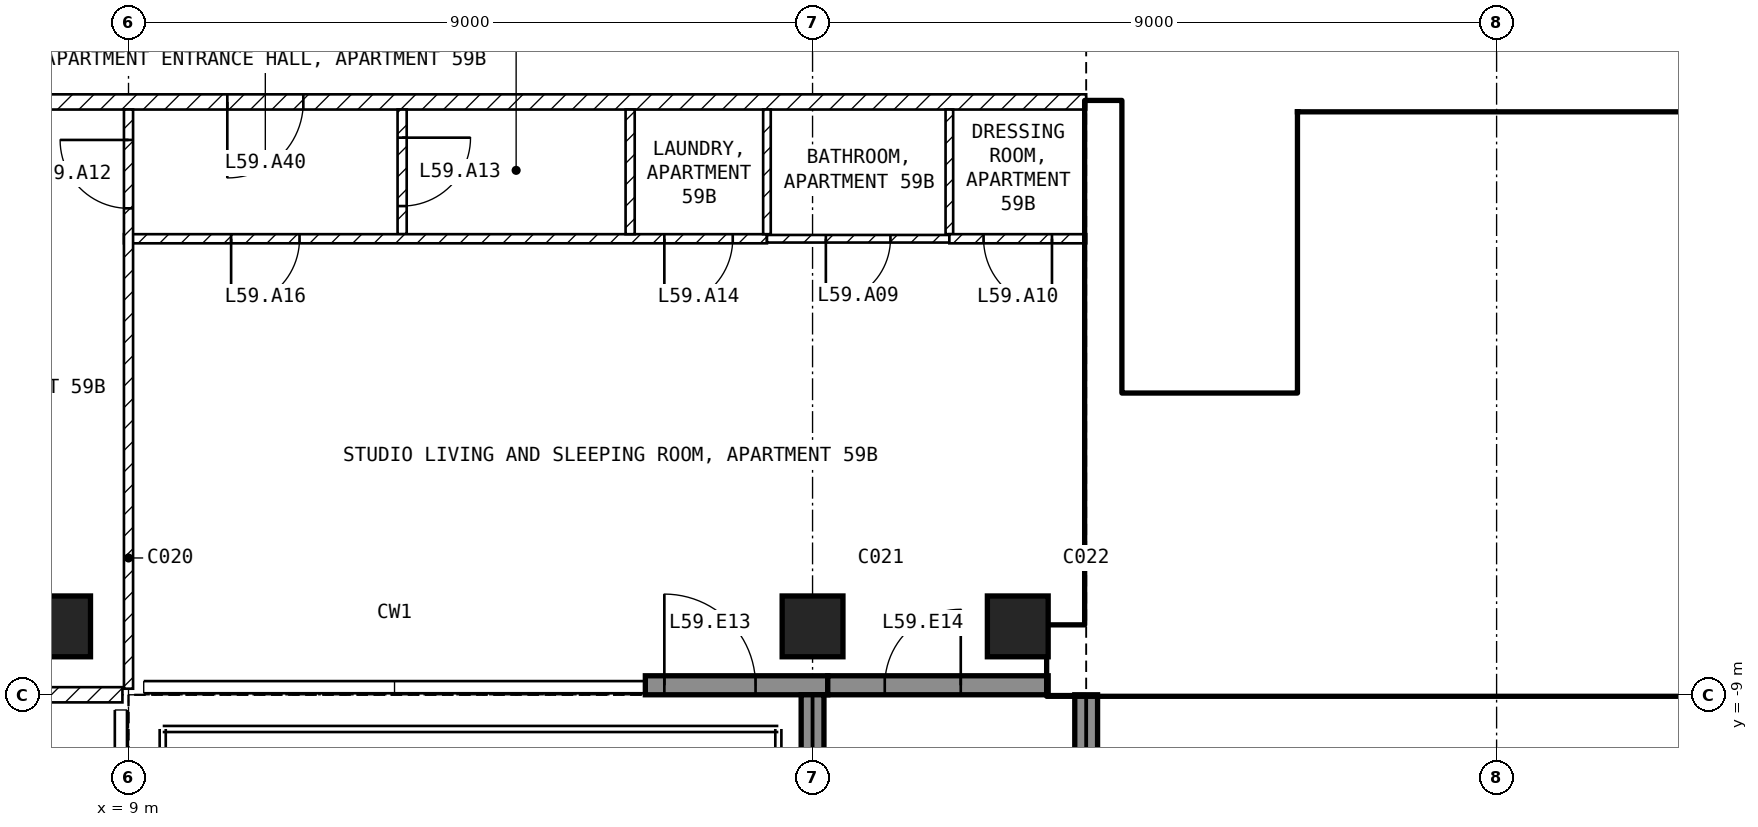
"""IFC4 building model, lengths in metres.
Left out: names, types, materials, properties, quantities, classifications, styles, units other than length and angle.
Written with IfcOpenShell. Run it as: python <this file> out.ifc"""

import sys

from ifc_helpers import new_model, si_unit, direction, frame, frame_2d, origin, origin_2d, place, context, subcontext, project, spatial, rectangle, extrude, element, fill, save


model = new_model("IFC4")
c1 = context("Model", 3, precision=1e-05, world=origin(), true_north=direction((0.0, 1.0)))
c2 = subcontext(c1, "Body", "Model", "MODEL_VIEW")
j1 = project(units=[si_unit("LENGTHUNIT", "METRE"), si_unit("PLANEANGLEUNIT", "RADIAN")], contexts=[c1])
p1 = place(None, origin())
s1 = spatial("IfcSite", under=j1, at=p1, CompositionType="ELEMENT")
p2 = place(p1, origin())
s2 = spatial("IfcBuilding", under=s1, at=p2, CompositionType="ELEMENT")
p3 = place(p2, frame((0.0, 0.0, 236.0)))
s3 = spatial("IfcBuildingStorey", under=s2, at=p3, CompositionType="ELEMENT", Elevation=236.0)
for number, where, z_axis, x_axis in (
    (1, (8.1, -8.1, -0.25), (0.0, 0.0, 1.0), (1.0, 0.0, 0.0)),
    (2, (18.0, -8.1, -0.25), (0.0, 0.0, 1.0), (1.0, 0.0, 0.0)),
    (3, (20.7, -8.1, -0.25), (0.0, 0.0, 1.0), (1.0, 0.0, 0.0)),
):
    element("IfcColumn", number, at=place(p3, frame(where, z_axis=z_axis, x_axis=x_axis)), inside=s3, PredefinedType="COLUMN", context=c2, shape_type="SweptSolid", body=[
        extrude(rectangle(XDim=0.8, YDim=0.8, at=origin_2d()), origin(), (0.0, 0.0, 1.0), 3.5),
    ])
p4 = place(p3, frame((15.8, -8.875, 0.0), z_axis=(0.0, 0.0, 1.0), x_axis=(1.0, 0.0, 0.0)))
e4 = element("IfcWall", 4, at=p4, inside=s3, PredefinedType="SOLIDWALL", context=c2, shape_type="SweptSolid", body=[
    extrude(rectangle(XDim=2.4, YDim=0.25, at=frame_2d((1.2, 0.0))), origin(), (0.0, 0.0, 1.0), 3.25),
])
p5 = place(p4, frame((0.25, 0.0, 0.0)))
e5 = element("IfcOpeningElement", 5, at=p5, cuts=e4, PredefinedType="OPENING", context=c2, shape_type="SweptSolid", body=[
    extrude(rectangle(XDim=1.2, YDim=2.4, at=frame_2d((0.6, 1.2))), frame((0.0, 0.135, 0.0), z_axis=(0.0, -1.0, 0.0), x_axis=(1.0, 0.0, 0.0)), (0.0, 0.0, 1.0), 0.27),
])
p6 = place(p3, frame((18.2, -8.875, 0.0), z_axis=(0.0, 0.0, 1.0), x_axis=(1.0, 0.0, 0.0)))
e6 = element("IfcWall", 6, at=p6, inside=s3, PredefinedType="SOLIDWALL", context=c2, shape_type="SweptSolid", body=[
    extrude(rectangle(XDim=2.9, YDim=0.25, at=frame_2d((1.45, 0.0))), origin(), (0.0, 0.0, 1.0), 3.25),
])
p7 = place(p6, frame((0.75, 0.0, 0.0)))
e7 = element("IfcOpeningElement", 7, at=p7, cuts=e6, PredefinedType="OPENING", context=c2, shape_type="SweptSolid", body=[
    extrude(rectangle(XDim=1.0, YDim=2.4, at=frame_2d((0.5, 1.2))), frame((0.0, 0.135, 0.0), z_axis=(0.0, -1.0, 0.0), x_axis=(1.0, 0.0, 0.0)), (0.0, 0.0, 1.0), 0.27),
])
p8 = place(p3, frame((18.0, -9.0, 0.0), z_axis=(0.0, 0.0, 1.0), x_axis=(0.0, -1.0, 0.0)))
e8 = element("IfcWall", 8, at=p8, inside=s3, PredefinedType="SOLIDWALL", context=c2, shape_type="SweptSolid", body=[
    extrude(rectangle(XDim=2.74, YDim=0.3, at=frame_2d((1.37, 0.0))), origin(), (0.0, 0.0, 1.0), 3.25),
])
p9 = place(p3, frame((21.6, -9.0, 0.0), z_axis=(0.0, 0.0, 1.0), x_axis=(0.0, -1.0, 0.0)))
e9 = element("IfcWall", 9, at=p9, inside=s3, PredefinedType="SOLIDWALL", context=c2, shape_type="SweptSolid", body=[
    extrude(rectangle(XDim=2.7, YDim=0.3, at=frame_2d((1.35, 0.0))), origin(), (0.0, 0.0, 1.0), 3.25),
])
p10 = place(p3, frame((21.1, -8.55, 0.0), z_axis=(0.0, 0.0, 1.0), x_axis=(1.0, 0.0, 0.0)))
e10 = element("IfcWall", 10, at=p10, inside=s3, PredefinedType="SHEAR", context=c2, shape_type="SweptSolid", body=[
    extrude(rectangle(XDim=9.1, YDim=0.9, at=frame_2d((4.55, 0.0))), origin(), (0.0, 0.0, 1.0), 3.25),
])
p11 = place(p3, frame((21.825, -8.1, 0.0), z_axis=(0.0, 0.0, 1.0), x_axis=(0.0, 1.0, 0.0)))
e11 = element("IfcWall", 11, at=p11, inside=s3, PredefinedType="SHEAR", context=c2, shape_type="SweptSolid", body=[
    extrude(rectangle(XDim=6.9, YDim=0.45, at=frame_2d((3.45, 0.0))), origin(), (0.0, 0.0, 1.0), 3.25),
])
p12 = place(p3, frame((24.5, -5.05, 0.0), z_axis=(0.0, 0.0, 1.0), x_axis=(0.0, 1.0, 0.0)))
e12 = element("IfcWall", 12, at=p12, inside=s3, PredefinedType="SOLIDWALL", context=c2, shape_type="SweptSolid", body=[
    extrude(rectangle(XDim=3.7, YDim=0.2, at=frame_2d((1.85, 0.0))), origin(), (0.0, 0.0, 1.0), 3.25),
])
p13 = place(p12, frame((0.1, 0.0, 0.0)))
e13 = element("IfcOpeningElement", 13, at=p13, cuts=e12, PredefinedType="OPENING", context=c2, shape_type="SweptSolid", body=[
    extrude(rectangle(XDim=0.8, YDim=2.1, at=frame_2d((0.4, 1.05))), frame((0.0, 0.11, 0.0), z_axis=(0.0, -1.0, 0.0), x_axis=(1.0, 0.0, 0.0)), (0.0, 0.0, 1.0), 0.22),
])
p14 = place(p3, frame((22.05, -5.15, 0.0), z_axis=(0.0, 0.0, 1.0), x_axis=(1.0, 0.0, 0.0)))
e14 = element("IfcWall", 14, at=p14, inside=s3, PredefinedType="SOLIDWALL", context=c2, shape_type="SweptSolid", body=[
    extrude(rectangle(XDim=6.3, YDim=0.2, at=frame_2d((3.15, 0.0))), origin(), (0.0, 0.0, 1.0), 3.25),
])
p15 = place(p14, frame((0.2, 0.0, 0.0)))
e15 = element("IfcOpeningElement", 15, at=p15, cuts=e14, PredefinedType="OPENING", context=c2, shape_type="SweptSolid", body=[
    extrude(rectangle(XDim=1.0, YDim=2.1, at=frame_2d((0.5, 1.05))), frame((0.0, 0.11, 0.0), z_axis=(0.0, -1.0, 0.0), x_axis=(1.0, 0.0, 0.0)), (0.0, 0.0, 1.0), 0.22),
])
p16 = place(p3, frame((28.25, -8.1, 0.0), z_axis=(0.0, 0.0, 1.0), x_axis=(0.0, 1.0, 0.0)))
e16 = element("IfcWall", 16, at=p16, inside=s3, PredefinedType="SOLIDWALL", context=c2, shape_type="SweptSolid", body=[
    extrude(rectangle(XDim=2.85, YDim=0.2, at=frame_2d((1.425, 0.0))), origin(), (0.0, 0.0, 1.0), 3.25),
])
p17 = place(p3, frame((24.6, -1.45, 0.0), z_axis=(0.0, 0.0, 1.0), x_axis=(1.0, 0.0, 0.0)))
e17 = element("IfcWall", 17, at=p17, inside=s3, PredefinedType="SOLIDWALL", context=c2, shape_type="SweptSolid", body=[
    extrude(rectangle(XDim=8.75, YDim=0.2, at=frame_2d((4.375, 0.0))), origin(), (0.0, 0.0, 1.0), 3.25),
])
p18 = place(p17, frame((0.4, 0.0, 0.0)))
e18 = element("IfcOpeningElement", 18, at=p18, cuts=e17, PredefinedType="OPENING", context=c2, shape_type="SweptSolid", body=[
    extrude(rectangle(XDim=1.0, YDim=2.1, at=frame_2d((0.5, 1.05))), frame((0.0, 0.11, 0.0), z_axis=(0.0, -1.0, 0.0), x_axis=(1.0, 0.0, 0.0)), (0.0, 0.0, 1.0), 0.22),
])
p19 = place(p17, frame((2.4, 0.0, 0.0)))
e19 = element("IfcOpeningElement", 19, at=p19, cuts=e17, PredefinedType="OPENING", context=c2, shape_type="SweptSolid", body=[
    extrude(rectangle(XDim=1.0, YDim=2.1, at=frame_2d((0.5, 1.05))), frame((0.0, 0.11, 0.0), z_axis=(0.0, -1.0, 0.0), x_axis=(1.0, 0.0, 0.0)), (0.0, 0.0, 1.0), 0.22),
])
p20 = place(p17, frame((4.4, 0.0, 0.0)))
e20 = element("IfcOpeningElement", 20, at=p20, cuts=e17, PredefinedType="OPENING", context=c2, shape_type="SweptSolid", body=[
    extrude(rectangle(XDim=1.0, YDim=2.1, at=frame_2d((0.5, 1.05))), frame((0.0, 0.11, 0.0), z_axis=(0.0, -1.0, 0.0), x_axis=(1.0, 0.0, 0.0)), (0.0, 0.0, 1.0), 0.22),
])
p21 = place(p17, frame((6.925, 0.0, 0.0)))
e21 = element("IfcOpeningElement", 21, at=p21, cuts=e17, PredefinedType="OPENING", context=c2, shape_type="SweptSolid", body=[
    extrude(rectangle(XDim=0.9, YDim=2.1, at=frame_2d((0.45, 1.05))), frame((0.0, 0.11, 0.0), z_axis=(0.0, -1.0, 0.0), x_axis=(1.0, 0.0, 0.0)), (0.0, 0.0, 1.0), 0.22),
])
p22 = place(p3, frame((24.6, -3.95, 0.0), z_axis=(0.0, 0.0, 1.0), x_axis=(1.0, 0.0, 0.0)))
e22 = element("IfcWall", 22, at=p22, inside=s3, PredefinedType="SOLIDWALL", context=c2, shape_type="SweptSolid", body=[
    extrude(rectangle(XDim=8.75, YDim=0.2, at=frame_2d((4.375, 0.0))), origin(), (0.0, 0.0, 1.0), 3.25),
])
for number, where, z_axis, x_axis in (
    (23, (26.5, -3.85, 0.0), (0.0, 0.0, 1.0), (0.0, 1.0, 0.0)),
    (24, (28.5, -3.85, 0.0), (0.0, 0.0, 1.0), (0.0, 1.0, 0.0)),
):
    element("IfcWall", number, at=place(p3, frame(where, z_axis=z_axis, x_axis=x_axis)), inside=s3, PredefinedType="SOLIDWALL", context=c2, shape_type="SweptSolid", body=[
        extrude(rectangle(XDim=2.3, YDim=0.2, at=frame_2d((1.15, 0.0))), origin(), (0.0, 0.0, 1.0), 3.25),
    ])
p23 = place(p3, frame((27.4, -5.05, 0.0), z_axis=(0.0, 0.0, 1.0), x_axis=(0.0, 1.0, 0.0)))
e25 = element("IfcWall", 25, at=p23, inside=s3, PredefinedType="PARTITIONING", context=c2, shape_type="SweptSolid", body=[
    extrude(rectangle(XDim=1.0, YDim=0.15, at=frame_2d((0.5, 0.0))), origin(), (0.0, 0.0, 1.0), 3.25),
])
p24 = place(p23, frame((0.1, 0.0, 0.0)))
e26 = element("IfcOpeningElement", 26, at=p24, cuts=e25, PredefinedType="OPENING", context=c2, shape_type="SweptSolid", body=[
    extrude(rectangle(XDim=0.8, YDim=2.1, at=frame_2d((0.4, 1.05))), frame((0.0, 0.085, 0.0), z_axis=(0.0, -1.0, 0.0), x_axis=(1.0, 0.0, 0.0)), (0.0, 0.0, 1.0), 0.17),
])
p25 = place(p3, frame((21.6, -1.2, 0.0), z_axis=(0.0, 0.0, 1.0), x_axis=(-1.0, 0.0, 0.0)))
e27 = element("IfcWall", 27, at=p25, inside=s3, PredefinedType="PARTITIONING", context=c2, shape_type="SweptSolid", body=[
    extrude(rectangle(XDim=17.2, YDim=0.2, at=frame_2d((8.6, 0.0))), origin(), (0.0, 0.0, 1.0), 3.25),
])
p26 = place(p25, frame((10.3, 0.0, 0.0)))
e28 = element("IfcOpeningElement", 28, at=p26, cuts=e27, PredefinedType="OPENING", context=c2, shape_type="SweptSolid", body=[
    extrude(rectangle(XDim=1.0, YDim=2.1, at=frame_2d((0.5, 1.05))), frame((0.0, 0.11, 0.0), z_axis=(0.0, -1.0, 0.0), x_axis=(1.0, 0.0, 0.0)), (0.0, 0.0, 1.0), 0.22),
])
p27 = place(p3, frame((8.92, -9.0, 0.0), z_axis=(0.0, 0.0, 1.0), x_axis=(-1.0, 0.0, 0.0)))
e29 = element("IfcWall", 29, at=p27, inside=s3, PredefinedType="PARTITIONING", context=c2, shape_type="SweptSolid", body=[
    extrude(rectangle(XDim=17.84, YDim=0.2, at=frame_2d((8.92, 0.0))), origin(), (0.0, 0.0, 1.0), 3.25),
])
p28 = place(p27, frame((8.42, 0.0, 0.0)))
e30 = element("IfcOpeningElement", 30, at=p28, cuts=e29, PredefinedType="OPENING", context=c2, shape_type="SweptSolid", body=[
    extrude(rectangle(XDim=1.0, YDim=2.1, at=frame_2d((0.5, 1.05))), frame((0.0, 0.11, 0.0), z_axis=(0.0, -1.0, 0.0), x_axis=(1.0, 0.0, 0.0)), (0.0, 0.0, 1.0), 0.22),
])
p29 = place(p3, frame((12.6, -1.3, 0.0), z_axis=(0.0, 0.0, 1.0), x_axis=(0.0, -1.0, 0.0)))
e31 = element("IfcWall", 31, at=p29, inside=s3, PredefinedType="PARTITIONING", context=c2, shape_type="SweptSolid", body=[
    extrude(rectangle(XDim=1.64, YDim=0.12, at=frame_2d((0.82, 0.0))), origin(), (0.0, 0.0, 1.0), 3.25),
])
p30 = place(p29, frame((0.37, 0.0, 0.0)))
e32 = element("IfcOpeningElement", 32, at=p30, cuts=e31, PredefinedType="OPENING", context=c2, shape_type="SweptSolid", body=[
    extrude(rectangle(XDim=0.9, YDim=2.1, at=frame_2d((0.45, 1.05))), frame((0.0, 0.07, 0.0), z_axis=(0.0, -1.0, 0.0), x_axis=(1.0, 0.0, 0.0)), (0.0, 0.0, 1.0), 0.14),
])
p31 = place(p3, frame((17.4, -3.0, 0.0), z_axis=(0.0, 0.0, 1.0), x_axis=(-1.0, 0.0, 0.0)))
e33 = element("IfcWall", 33, at=p31, inside=s3, PredefinedType="PARTITIONING", context=c2, shape_type="SweptSolid", body=[
    extrude(rectangle(XDim=8.46, YDim=0.12, at=frame_2d((4.23, 0.0))), origin(), (0.0, 0.0, 1.0), 3.25),
])
p32 = place(p31, frame((0.45, 0.0, 0.0)))
e34 = element("IfcOpeningElement", 34, at=p32, cuts=e33, PredefinedType="OPENING", context=c2, shape_type="SweptSolid", body=[
    extrude(rectangle(XDim=0.9, YDim=2.1, at=frame_2d((0.45, 1.05))), frame((0.0, 0.07, 0.0), z_axis=(0.0, -1.0, 0.0), x_axis=(1.0, 0.0, 0.0)), (0.0, 0.0, 1.0), 0.14),
])
p33 = place(p31, frame((6.15, 0.0, 0.0)))
e35 = element("IfcOpeningElement", 35, at=p33, cuts=e33, PredefinedType="OPENING", context=c2, shape_type="SweptSolid", body=[
    extrude(rectangle(XDim=0.9, YDim=2.1, at=frame_2d((0.45, 1.05))), frame((0.0, 0.07, 0.0), z_axis=(0.0, -1.0, 0.0), x_axis=(1.0, 0.0, 0.0)), (0.0, 0.0, 1.0), 0.14),
])
p34 = place(p3, frame((9.0, -8.92, 0.0), z_axis=(0.0, 0.0, 1.0), x_axis=(0.0, 1.0, 0.0)))
e36 = element("IfcWall", 36, at=p34, inside=s3, PredefinedType="PARTITIONING", context=c2, shape_type="SweptSolid", body=[
    extrude(rectangle(XDim=7.62, YDim=0.12, at=frame_2d((3.81, 0.0))), origin(), (0.0, 0.0, 1.0), 3.25),
])
p35 = place(p34, frame((6.32, 0.0, 0.0)))
e37 = element("IfcOpeningElement", 37, at=p35, cuts=e36, PredefinedType="OPENING", context=c2, shape_type="SweptSolid", body=[
    extrude(rectangle(XDim=0.9, YDim=2.1, at=frame_2d((0.45, 1.05))), frame((0.0, 0.07, 0.0), z_axis=(0.0, -1.0, 0.0), x_axis=(1.0, 0.0, 0.0)), (0.0, 0.0, 1.0), 0.14),
])
p36 = place(p3, frame((15.6, -1.3, 0.0), z_axis=(0.0, 0.0, 1.0), x_axis=(0.0, -1.0, 0.0)))
e38 = element("IfcWall", 38, at=p36, inside=s3, PredefinedType="PARTITIONING", context=c2, shape_type="SweptSolid", body=[
    extrude(rectangle(XDim=1.64, YDim=0.12, at=frame_2d((0.82, 0.0))), origin(), (0.0, 0.0, 1.0), 3.25),
])
for number, where, z_axis, x_axis in (
    (39, (17.4, -1.3, 0.0), (0.0, 0.0, 1.0), (0.0, -1.0, 0.0)),
    (40, (19.8, -1.3, 0.0), (0.0, 0.0, 1.0), (0.0, -1.0, 0.0)),
):
    element("IfcWall", number, at=place(p3, frame(where, z_axis=z_axis, x_axis=x_axis)), inside=s3, PredefinedType="PARTITIONING", context=c2, shape_type="SweptSolid", body=[
        extrude(rectangle(XDim=1.64, YDim=0.1, at=frame_2d((0.82, 0.0))), origin(), (0.0, 0.0, 1.0), 3.25),
    ])
p37 = place(p3, frame((19.8, -3.0, 0.0), z_axis=(0.0, 0.0, 1.0), x_axis=(-1.0, 0.0, 0.0)))
e41 = element("IfcWall", 41, at=p37, inside=s3, PredefinedType="PARTITIONING", context=c2, shape_type="SweptSolid", body=[
    extrude(rectangle(XDim=2.4, YDim=0.1, at=frame_2d((1.2, 0.0))), origin(), (0.0, 0.0, 1.0), 3.25),
])
p38 = place(p37, frame((0.775, 0.0, 0.0)))
e42 = element("IfcOpeningElement", 42, at=p38, cuts=e41, PredefinedType="OPENING", context=c2, shape_type="SweptSolid", body=[
    extrude(rectangle(XDim=0.85, YDim=2.1, at=frame_2d((0.425, 1.05))), frame((0.0, 0.06, 0.0), z_axis=(0.0, -1.0, 0.0), x_axis=(1.0, 0.0, 0.0)), (0.0, 0.0, 1.0), 0.12),
])
p39 = place(p3, frame((21.6, -3.0, 0.0), z_axis=(0.0, 0.0, 1.0), x_axis=(-1.0, 0.0, 0.0)))
e43 = element("IfcWall", 43, at=p39, inside=s3, PredefinedType="PARTITIONING", context=c2, shape_type="SweptSolid", body=[
    extrude(rectangle(XDim=1.8, YDim=0.12, at=frame_2d((0.9, 0.0))), origin(), (0.0, 0.0, 1.0), 3.25),
])
p40 = place(p39, frame((0.45, 0.0, 0.0)))
e44 = element("IfcOpeningElement", 44, at=p40, cuts=e43, PredefinedType="OPENING", context=c2, shape_type="SweptSolid", body=[
    extrude(rectangle(XDim=0.9, YDim=2.1, at=frame_2d((0.45, 1.05))), frame((0.0, 0.07, 0.0), z_axis=(0.0, -1.0, 0.0), x_axis=(1.0, 0.0, 0.0)), (0.0, 0.0, 1.0), 0.14),
])
p41 = place(p5, origin())
e45 = element("IfcDoor", 45, at=p41, inside=s3, OperationType="SINGLE_SWING_LEFT", PredefinedType="DOOR", context=c2, shape_type="SweptSolid", body=[
    extrude(rectangle(XDim=1.2, YDim=2.4, at=frame_2d((0.6, 1.2))), frame((0.0, 0.025, 0.0), z_axis=(0.0, -1.0, 0.0), x_axis=(1.0, 0.0, 0.0)), (0.0, 0.0, 1.0), 0.05),
])
fill(e5, e45)
p42 = place(p7, origin())
e46 = element("IfcDoor", 46, at=p42, inside=s3, OperationType="SINGLE_SWING_RIGHT", PredefinedType="DOOR", context=c2, shape_type="SweptSolid", body=[
    extrude(rectangle(XDim=1.0, YDim=2.4, at=frame_2d((0.5, 1.2))), frame((0.0, 0.025, 0.0), z_axis=(0.0, -1.0, 0.0), x_axis=(1.0, 0.0, 0.0)), (0.0, 0.0, 1.0), 0.05),
])
fill(e7, e46)
p43 = place(p18, origin())
e47 = element("IfcDoor", 47, at=p43, inside=s3, OperationType="DOUBLE_DOOR_SLIDING", PredefinedType="DOOR", context=c2, shape_type="SweptSolid", body=[
    extrude(rectangle(XDim=1.0, YDim=2.1, at=frame_2d((0.5, 1.05))), frame((0.0, 0.025, 0.0), z_axis=(0.0, -1.0, 0.0), x_axis=(1.0, 0.0, 0.0)), (0.0, 0.0, 1.0), 0.05),
])
fill(e18, e47)
p44 = place(p19, origin())
e48 = element("IfcDoor", 48, at=p44, inside=s3, OperationType="DOUBLE_DOOR_SLIDING", PredefinedType="DOOR", context=c2, shape_type="SweptSolid", body=[
    extrude(rectangle(XDim=1.0, YDim=2.1, at=frame_2d((0.5, 1.05))), frame((0.0, 0.025, 0.0), z_axis=(0.0, -1.0, 0.0), x_axis=(1.0, 0.0, 0.0)), (0.0, 0.0, 1.0), 0.05),
])
fill(e19, e48)
p45 = place(p20, origin())
e49 = element("IfcDoor", 49, at=p45, inside=s3, OperationType="DOUBLE_DOOR_SLIDING", PredefinedType="DOOR", context=c2, shape_type="SweptSolid", body=[
    extrude(rectangle(XDim=1.0, YDim=2.1, at=frame_2d((0.5, 1.05))), frame((0.0, 0.025, 0.0), z_axis=(0.0, -1.0, 0.0), x_axis=(1.0, 0.0, 0.0)), (0.0, 0.0, 1.0), 0.05),
])
fill(e20, e49)
p46 = place(p15, origin())
e50 = element("IfcDoor", 50, at=p46, inside=s3, OperationType="SINGLE_SWING_LEFT", PredefinedType="DOOR", context=c2, shape_type="SweptSolid", body=[
    extrude(rectangle(XDim=1.0, YDim=2.1, at=frame_2d((0.5, 1.05))), frame((0.0, 0.025, 0.0), z_axis=(0.0, -1.0, 0.0), x_axis=(1.0, 0.0, 0.0)), (0.0, 0.0, 1.0), 0.05),
])
fill(e15, e50)
p47 = place(p13, origin())
e51 = element("IfcDoor", 51, at=p47, inside=s3, OperationType="SINGLE_SWING_LEFT", PredefinedType="DOOR", context=c2, shape_type="SweptSolid", body=[
    extrude(rectangle(XDim=0.8, YDim=2.1, at=frame_2d((0.4, 1.05))), frame((0.0, 0.025, 0.0), z_axis=(0.0, -1.0, 0.0), x_axis=(1.0, 0.0, 0.0)), (0.0, 0.0, 1.0), 0.05),
])
fill(e13, e51)
p48 = place(p24, origin())
e52 = element("IfcDoor", 52, at=p48, inside=s3, OperationType="SINGLE_SWING_LEFT", PredefinedType="DOOR", context=c2, shape_type="SweptSolid", body=[
    extrude(rectangle(XDim=0.8, YDim=2.1, at=frame_2d((0.4, 1.05))), frame((0.0, 0.025, 0.0), z_axis=(0.0, -1.0, 0.0), x_axis=(1.0, 0.0, 0.0)), (0.0, 0.0, 1.0), 0.05),
])
fill(e26, e52)
p49 = place(p38, origin())
e53 = element("IfcDoor", 53, at=p49, inside=s3, OperationType="SINGLE_SWING_RIGHT", PredefinedType="DOOR", context=c2, shape_type="SweptSolid", body=[
    extrude(rectangle(XDim=0.85, YDim=2.1, at=frame_2d((0.425, 1.05))), frame((0.0, 0.025, 0.0), z_axis=(0.0, -1.0, 0.0), x_axis=(1.0, 0.0, 0.0)), (0.0, 0.0, 1.0), 0.05),
])
fill(e42, e53)
p50 = place(p40, origin())
e54 = element("IfcDoor", 54, at=p50, inside=s3, OperationType="SINGLE_SWING_LEFT", PredefinedType="DOOR", context=c2, shape_type="SweptSolid", body=[
    extrude(rectangle(XDim=0.9, YDim=2.1, at=frame_2d((0.45, 1.05))), frame((0.0, 0.025, 0.0), z_axis=(0.0, -1.0, 0.0), x_axis=(1.0, 0.0, 0.0)), (0.0, 0.0, 1.0), 0.05),
])
fill(e44, e54)
p51 = place(p35, origin())
e55 = element("IfcDoor", 55, at=p51, inside=s3, OperationType="SINGLE_SWING_RIGHT", PredefinedType="DOOR", context=c2, shape_type="SweptSolid", body=[
    extrude(rectangle(XDim=0.9, YDim=2.1, at=frame_2d((0.45, 1.05))), frame((0.0, 0.025, 0.0), z_axis=(0.0, -1.0, 0.0), x_axis=(1.0, 0.0, 0.0)), (0.0, 0.0, 1.0), 0.05),
])
fill(e37, e55)
p52 = place(p30, origin())
e56 = element("IfcDoor", 56, at=p52, inside=s3, OperationType="SINGLE_SWING_LEFT", PredefinedType="DOOR", context=c2, shape_type="SweptSolid", body=[
    extrude(rectangle(XDim=0.9, YDim=2.1, at=frame_2d((0.45, 1.05))), frame((0.0, 0.025, 0.0), z_axis=(0.0, -1.0, 0.0), x_axis=(1.0, 0.0, 0.0)), (0.0, 0.0, 1.0), 0.05),
])
fill(e32, e56)
p53 = place(p32, origin())
e57 = element("IfcDoor", 57, at=p53, inside=s3, OperationType="SINGLE_SWING_RIGHT", PredefinedType="DOOR", context=c2, shape_type="SweptSolid", body=[
    extrude(rectangle(XDim=0.9, YDim=2.1, at=frame_2d((0.45, 1.05))), frame((0.0, 0.025, 0.0), z_axis=(0.0, -1.0, 0.0), x_axis=(1.0, 0.0, 0.0)), (0.0, 0.0, 1.0), 0.05),
])
fill(e34, e57)
p54 = place(p33, origin())
e58 = element("IfcDoor", 58, at=p54, inside=s3, OperationType="SINGLE_SWING_RIGHT", PredefinedType="DOOR", context=c2, shape_type="SweptSolid", body=[
    extrude(rectangle(XDim=0.9, YDim=2.1, at=frame_2d((0.45, 1.05))), frame((0.0, 0.025, 0.0), z_axis=(0.0, -1.0, 0.0), x_axis=(1.0, 0.0, 0.0)), (0.0, 0.0, 1.0), 0.05),
])
fill(e35, e58)
p55 = place(p26, origin())
e59 = element("IfcDoor", 59, at=p55, inside=s3, OperationType="SINGLE_SWING_RIGHT", PredefinedType="DOOR", context=c2, shape_type="SweptSolid", body=[
    extrude(rectangle(XDim=1.0, YDim=2.1, at=frame_2d((0.5, 1.05))), frame((0.0, 0.025, 0.0), z_axis=(0.0, -1.0, 0.0), x_axis=(1.0, 0.0, 0.0)), (0.0, 0.0, 1.0), 0.05),
])
fill(e28, e59)
save(model, sys.argv[1])
